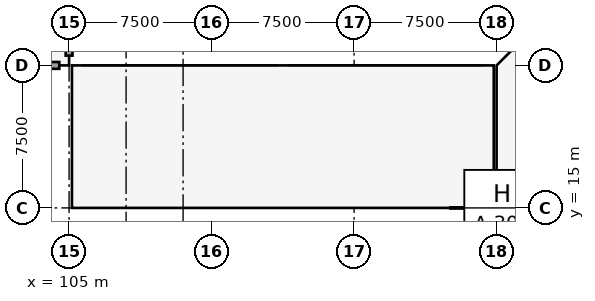
"""IFC4 building model, lengths in metres.
Left out: names, types, materials, properties, quantities, classifications, styles, units other than length and angle.
Written with IfcOpenShell. Run it as: python <this file> out.ifc"""

import sys

from ifc_helpers import new_model, si_unit, direction, frame, frame_2d, origin, origin_2d, place, context, subcontext, project, spatial, rectangle, circle, extrude, element, save


model = new_model("IFC4")
c1 = context("Model", 3, precision=1e-05, world=origin(), true_north=direction((0.0, 1.0)))
c2 = subcontext(c1, "Body", "Model", "MODEL_VIEW")
j1 = project(units=[si_unit("LENGTHUNIT", "METRE"), si_unit("PLANEANGLEUNIT", "RADIAN")], contexts=[c1])
p1 = place(None, origin())
s1 = spatial("IfcSite", under=j1, at=p1, CompositionType="ELEMENT")
p2 = place(p1, origin())
s2 = spatial("IfcBuilding", under=s1, at=p2, CompositionType="ELEMENT")
p3 = place(p2, origin())
s3 = spatial("IfcBuildingStorey", under=s2, at=p3, CompositionType="ELEMENT", Elevation=0.0)
p4 = place(p3, frame((105.0, 22.5, 0.0), z_axis=(0.0, 0.0, 1.0), x_axis=(1.0, 0.0, 0.0)))
e1 = element("IfcColumn", 1, at=p4, inside=s3, PredefinedType="COLUMN", context=c2, shape_type="SweptSolid", body=[
    extrude(rectangle(XDim=1.0, YDim=1.0, at=origin_2d()), origin(), (0.0, 0.0, 1.0), 4.8),
])
for number, where, z_axis, x_axis in (
    (2, (127.5, 15.0, 0.0), (0.0, 0.0, 1.0), (1.0, 0.0, 0.0)),
    (3, (127.5, 22.5, 0.0), (0.0, 0.0, 1.0), (1.0, 0.0, 0.0)),
):
    element("IfcColumn", number, at=place(p3, frame(where, z_axis=z_axis, x_axis=x_axis)), inside=s3, PredefinedType="COLUMN", context=c2, shape_type="SweptSolid", body=[
        extrude(circle(Radius=0.45, at=origin_2d()), origin(), (0.0, 0.0, 1.0), 4.8),
    ])
p5 = place(p3, frame((98.015, 22.5, 0.0), z_axis=(0.0, 0.0, 1.0), x_axis=(1.0, 0.0, 0.0)))
e4 = element("IfcWall", 4, at=p5, inside=s3, PredefinedType="SOLIDWALL", context=c2, shape_type="SweptSolid", body=[
    extrude(rectangle(XDim=6.47, YDim=0.36, at=frame_2d((3.235, 0.0))), origin(), (0.0, 0.0, 1.0), 3.72),
])
p6 = place(p5, frame((2.235, 0.0, 0.0)))
e5 = element("IfcOpeningElement", 5, at=p6, cuts=e4, PredefinedType="OPENING", context=c2, shape_type="SweptSolid", body=[
    extrude(rectangle(XDim=2.0, YDim=2.2, at=frame_2d((1.0, 1.1))), frame((0.0, 0.19, 0.0), z_axis=(0.0, -1.0, 0.0), x_axis=(1.0, 0.0, 0.0)), (0.0, 0.0, 1.0), 0.38),
])
p7 = place(p3, frame((105.0, 23.015, 0.0), z_axis=(0.0, 0.0, 1.0), x_axis=(0.0, 1.0, 0.0)))
e6 = element("IfcWall", 6, at=p7, inside=s3, PredefinedType="SOLIDWALL", context=c2, shape_type="SweptSolid", body=[
    extrude(rectangle(XDim=6.47, YDim=0.36, at=frame_2d((3.235, 0.0))), origin(), (0.0, 0.0, 1.0), 3.57),
])
p8 = place(p7, frame((1.12, 0.0, 0.6)))
e7 = element("IfcOpeningElement", 7, at=p8, cuts=e6, PredefinedType="OPENING", context=c2, shape_type="SweptSolid", body=[
    extrude(rectangle(XDim=1.1, YDim=1.8, at=frame_2d((0.55, 0.9))), frame((0.0, 0.19, 0.0), z_axis=(0.0, -1.0, 0.0), x_axis=(1.0, 0.0, 0.0)), (0.0, 0.0, 1.0), 0.38),
])
p9 = place(p7, frame((4.15, 0.0, 0.6)))
e8 = element("IfcOpeningElement", 8, at=p9, cuts=e6, PredefinedType="OPENING", context=c2, shape_type="SweptSolid", body=[
    extrude(rectangle(XDim=1.3, YDim=1.3, at=frame_2d((0.65, 0.65))), frame((0.0, 0.19, 0.0), z_axis=(0.0, -1.0, 0.0), x_axis=(1.0, 0.0, 0.0)), (0.0, 0.0, 1.0), 0.38),
])
p10 = place(p3, frame((127.5, 14.535, 0.0), z_axis=(0.0, 0.0, 1.0), x_axis=(0.0, -1.0, 0.0)))
e9 = element("IfcWall", 9, at=p10, inside=s3, PredefinedType="SOLIDWALL", context=c2, shape_type="SweptSolid", body=[
    extrude(rectangle(XDim=6.57, YDim=0.32, at=frame_2d((3.285, 0.0))), origin(), (0.0, 0.0, 1.0), 3.52),
])
p11 = place(p10, frame((2.31, 0.0, 0.6)))
e10 = element("IfcOpeningElement", 10, at=p11, cuts=e9, PredefinedType="OPENING", context=c2, shape_type="SweptSolid", body=[
    extrude(rectangle(XDim=1.95, YDim=1.3, at=frame_2d((0.975, 0.65))), frame((0.0, 0.17, 0.0), z_axis=(0.0, -1.0, 0.0), x_axis=(1.0, 0.0, 0.0)), (0.0, 0.0, 1.0), 0.34),
])
save(model, sys.argv[1])
